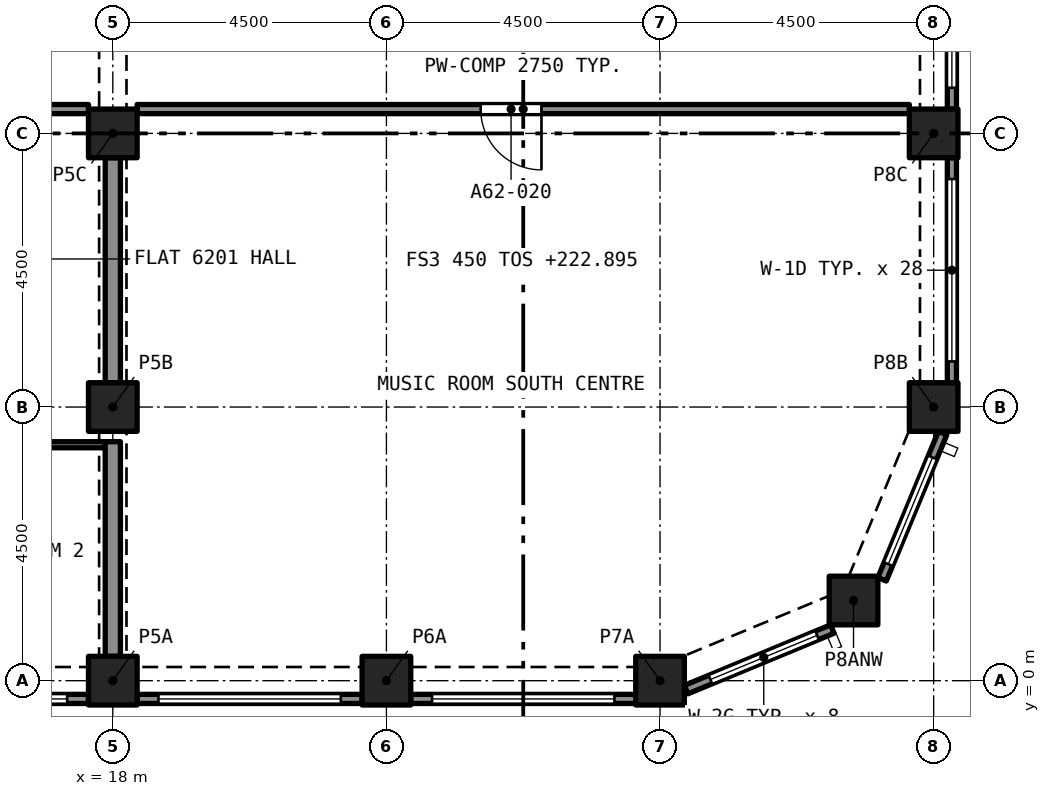
"""IFC4 building model, lengths in metres.
Left out: names, types, materials, properties, quantities, classifications, styles, units other than length and angle.
Written with IfcOpenShell. Run it as: python <this file> out.ifc"""

import sys

from ifc_helpers import new_model, si_unit, direction, frame, frame_2d, origin, origin_2d, place, context, subcontext, project, spatial, rectangle, extrude, element, fill, save


model = new_model("IFC4")
c1 = context("Model", 3, precision=1e-05, world=origin(), true_north=direction((0.0, 1.0)))
c2 = subcontext(c1, "Body", "Model", "MODEL_VIEW")
j1 = project(units=[si_unit("LENGTHUNIT", "METRE"), si_unit("PLANEANGLEUNIT", "RADIAN")], contexts=[c1])
p1 = place(None, origin())
s1 = spatial("IfcSite", under=j1, at=p1, CompositionType="ELEMENT")
p2 = place(p1, origin())
s2 = spatial("IfcBuilding", under=s1, at=p2, CompositionType="ELEMENT")
p3 = place(p2, frame((0.0, 0.0, 222.895)))
s3 = spatial("IfcBuildingStorey", under=s2, at=p3, CompositionType="ELEMENT", Elevation=222.895)
for number, where, z_axis, x_axis in (
    (1, (18.0, 0.0, 0.0), (0.0, 0.0, 1.0), (1.0, 0.0, 0.0)),
    (2, (22.5, 0.0, 0.0), (0.0, 0.0, 1.0), (1.0, 0.0, 0.0)),
    (3, (27.0, 0.0, 0.0), (0.0, 0.0, 1.0), (1.0, 0.0, 0.0)),
    (4, (30.182, 1.318, 0.0), (0.0, 0.0, 1.0), (1.0, 0.0, 0.0)),
    (5, (18.0, 4.5, 0.0), (0.0, 0.0, 1.0), (1.0, 0.0, 0.0)),
    (6, (31.5, 4.5, 0.0), (0.0, 0.0, 1.0), (1.0, 0.0, 0.0)),
    (7, (18.0, 9.0, 0.0), (0.0, 0.0, 1.0), (1.0, 0.0, 0.0)),
    (8, (31.5, 9.0, 0.0), (0.0, 0.0, 1.0), (1.0, 0.0, 0.0)),
):
    element("IfcColumn", number, at=place(p3, frame(where, z_axis=z_axis, x_axis=x_axis)), inside=s3, PredefinedType="COLUMN", context=c2, shape_type="SweptSolid", body=[
        extrude(rectangle(XDim=0.8, YDim=0.8, at=origin_2d()), origin(), (0.0, 0.0, 1.0), 3.2),
    ])
p4 = place(p3, frame((29.833, 0.849, 0.0), z_axis=(0.0, 0.0, 1.0), x_axis=(-0.923885342263, -0.382669406082, 0.0)))
e9 = element("IfcWall", 9, at=p4, inside=s3, PredefinedType="SOLIDWALL", context=c2, shape_type="SweptSolid", body=[
    extrude(rectangle(XDim=2.602, YDim=0.15, at=frame_2d((1.301, 0.0))), origin(), (0.0, 0.0, 1.0), 3.2),
])
p5 = place(p4, frame((0.27, 0.0, 0.45)))
e10 = element("IfcOpeningElement", 10, at=p5, cuts=e9, PredefinedType="OPENING", context=c2, shape_type="SweptSolid", body=[
    extrude(rectangle(XDim=1.9, YDim=1.95, at=frame_2d((0.95, 0.975))), frame((0.0, 0.085, 0.0), z_axis=(0.0, -1.0, 0.0), x_axis=(1.0, 0.0, 0.0)), (0.0, 0.0, 1.0), 0.17),
])
p6 = place(p3, frame((31.647, 4.071, 0.0), z_axis=(0.0, 0.0, 1.0), x_axis=(-0.382669406082, -0.923885342263, 0.0)))
e11 = element("IfcWall", 11, at=p6, inside=s3, PredefinedType="SOLIDWALL", context=c2, shape_type="SweptSolid", body=[
    extrude(rectangle(XDim=2.602, YDim=0.15, at=frame_2d((1.301, 0.0))), origin(), (0.0, 0.0, 1.0), 3.2),
])
p7 = place(p6, frame((0.432, 0.0, 0.45)))
e12 = element("IfcOpeningElement", 12, at=p7, cuts=e11, PredefinedType="OPENING", context=c2, shape_type="SweptSolid", body=[
    extrude(rectangle(XDim=1.9, YDim=1.95, at=frame_2d((0.95, 0.975))), frame((0.0, 0.085, 0.0), z_axis=(0.0, -1.0, 0.0), x_axis=(1.0, 0.0, 0.0)), (0.0, 0.0, 1.0), 0.17),
])
p8 = place(p3, frame((31.8, 8.6, 0.0), z_axis=(0.0, 0.0, 1.0), x_axis=(0.0, -1.0, 0.0)))
e13 = element("IfcWall", 13, at=p8, inside=s3, PredefinedType="SOLIDWALL", context=c2, shape_type="SweptSolid", body=[
    extrude(rectangle(XDim=3.7, YDim=0.15, at=frame_2d((1.85, 0.0))), origin(), (0.0, 0.0, 1.0), 3.2),
])
p9 = place(p8, frame((0.35, 0.0, 0.45)))
e14 = element("IfcOpeningElement", 14, at=p9, cuts=e13, PredefinedType="OPENING", context=c2, shape_type="SweptSolid", body=[
    extrude(rectangle(XDim=3.0, YDim=1.95, at=frame_2d((1.5, 0.975))), frame((0.0, 0.085, 0.0), z_axis=(0.0, -1.0, 0.0), x_axis=(1.0, 0.0, 0.0)), (0.0, 0.0, 1.0), 0.17),
])
p10 = place(p3, frame((31.8, 13.1, 0.0), z_axis=(0.0, 0.0, 1.0), x_axis=(0.0, -1.0, 0.0)))
e15 = element("IfcWall", 15, at=p10, inside=s3, PredefinedType="SOLIDWALL", context=c2, shape_type="SweptSolid", body=[
    extrude(rectangle(XDim=3.7, YDim=0.15, at=frame_2d((1.85, 0.0))), origin(), (0.0, 0.0, 1.0), 3.2),
])
p11 = place(p10, frame((0.35, 0.0, 0.45)))
e16 = element("IfcOpeningElement", 16, at=p11, cuts=e15, PredefinedType="OPENING", context=c2, shape_type="SweptSolid", body=[
    extrude(rectangle(XDim=3.0, YDim=1.95, at=frame_2d((1.5, 0.975))), frame((0.0, 0.085, 0.0), z_axis=(0.0, -1.0, 0.0), x_axis=(1.0, 0.0, 0.0)), (0.0, 0.0, 1.0), 0.17),
])
p12 = place(p3, frame((17.6, -0.3, 0.0), z_axis=(0.0, 0.0, 1.0), x_axis=(-1.0, 0.0, 0.0)))
e17 = element("IfcWall", 17, at=p12, inside=s3, PredefinedType="SOLIDWALL", context=c2, shape_type="SweptSolid", body=[
    extrude(rectangle(XDim=3.7, YDim=0.15, at=frame_2d((1.85, 0.0))), origin(), (0.0, 0.0, 1.0), 3.2),
])
p13 = place(p12, frame((0.35, 0.0, 0.45)))
e18 = element("IfcOpeningElement", 18, at=p13, cuts=e17, PredefinedType="OPENING", context=c2, shape_type="SweptSolid", body=[
    extrude(rectangle(XDim=3.0, YDim=1.95, at=frame_2d((1.5, 0.975))), frame((0.0, 0.085, 0.0), z_axis=(0.0, -1.0, 0.0), x_axis=(1.0, 0.0, 0.0)), (0.0, 0.0, 1.0), 0.17),
])
p14 = place(p3, frame((22.1, -0.3, 0.0), z_axis=(0.0, 0.0, 1.0), x_axis=(-1.0, 0.0, 0.0)))
e19 = element("IfcWall", 19, at=p14, inside=s3, PredefinedType="SOLIDWALL", context=c2, shape_type="SweptSolid", body=[
    extrude(rectangle(XDim=3.7, YDim=0.15, at=frame_2d((1.85, 0.0))), origin(), (0.0, 0.0, 1.0), 3.2),
])
p15 = place(p14, frame((0.35, 0.0, 0.45)))
e20 = element("IfcOpeningElement", 20, at=p15, cuts=e19, PredefinedType="OPENING", context=c2, shape_type="SweptSolid", body=[
    extrude(rectangle(XDim=3.0, YDim=1.95, at=frame_2d((1.5, 0.975))), frame((0.0, 0.085, 0.0), z_axis=(0.0, -1.0, 0.0), x_axis=(1.0, 0.0, 0.0)), (0.0, 0.0, 1.0), 0.17),
])
p16 = place(p3, frame((26.6, -0.3, 0.0), z_axis=(0.0, 0.0, 1.0), x_axis=(-1.0, 0.0, 0.0)))
e21 = element("IfcWall", 21, at=p16, inside=s3, PredefinedType="SOLIDWALL", context=c2, shape_type="SweptSolid", body=[
    extrude(rectangle(XDim=3.7, YDim=0.15, at=frame_2d((1.85, 0.0))), origin(), (0.0, 0.0, 1.0), 3.2),
])
p17 = place(p16, frame((0.35, 0.0, 0.45)))
e22 = element("IfcOpeningElement", 22, at=p17, cuts=e21, PredefinedType="OPENING", context=c2, shape_type="SweptSolid", body=[
    extrude(rectangle(XDim=3.0, YDim=1.95, at=frame_2d((1.5, 0.975))), frame((0.0, 0.085, 0.0), z_axis=(0.0, -1.0, 0.0), x_axis=(1.0, 0.0, 0.0)), (0.0, 0.0, 1.0), 0.17),
])
p18 = place(p3, frame((17.875, 3.88, 0.0), z_axis=(0.0, 0.0, 1.0), x_axis=(-1.0, 0.0, 0.0)))
e23 = element("IfcWall", 23, at=p18, inside=s3, PredefinedType="PARTITIONING", context=c2, shape_type="SweptSolid", body=[
    extrude(rectangle(XDim=4.375, YDim=0.1, at=frame_2d((2.188, 0.0))), origin(), (0.0, 0.0, 1.0), 2.9),
])
p19 = place(p18, frame((1.675, 0.0, 0.0)))
e24 = element("IfcOpeningElement", 24, at=p19, cuts=e23, PredefinedType="OPENING", context=c2, shape_type="SweptSolid", body=[
    extrude(rectangle(XDim=0.9, YDim=2.1, at=frame_2d((0.45, 1.05))), frame((0.0, 0.06, 0.0), z_axis=(0.0, -1.0, 0.0), x_axis=(1.0, 0.0, 0.0)), (0.0, 0.0, 1.0), 0.12),
])
p20 = place(p3, frame((18.0, 0.4, 0.0), z_axis=(0.0, 0.0, 1.0), x_axis=(0.0, 1.0, 0.0)))
e25 = element("IfcWall", 25, at=p20, inside=s3, PredefinedType="PARTITIONING", context=c2, shape_type="SweptSolid", body=[
    extrude(rectangle(XDim=3.53, YDim=0.25, at=frame_2d((1.765, 0.0))), origin(), (0.0, 0.0, 1.0), 2.38),
])
p21 = place(p3, frame((18.0, 4.9, 0.0), z_axis=(0.0, 0.0, 1.0), x_axis=(0.0, 1.0, 0.0)))
e26 = element("IfcWall", 26, at=p21, inside=s3, PredefinedType="PARTITIONING", context=c2, shape_type="SweptSolid", body=[
    extrude(rectangle(XDim=3.7, YDim=0.25, at=frame_2d((1.85, 0.0))), origin(), (0.0, 0.0, 1.0), 2.38),
])
p22 = place(p3, frame((17.6, 9.4, 0.0), z_axis=(0.0, 0.0, 1.0), x_axis=(-1.0, 0.0, 0.0)))
e27 = element("IfcWall", 27, at=p22, inside=s3, PredefinedType="PARTITIONING", context=c2, shape_type="SweptSolid", body=[
    extrude(rectangle(XDim=2.65, YDim=0.15, at=frame_2d((1.325, 0.0))), origin(), (0.0, 0.0, 1.0), 2.9),
])
p23 = place(p22, frame((1.25, 0.0, 0.0)))
e28 = element("IfcOpeningElement", 28, at=p23, cuts=e27, PredefinedType="OPENING", context=c2, shape_type="SweptSolid", body=[
    extrude(rectangle(XDim=1.2, YDim=2.4, at=frame_2d((0.6, 1.2))), frame((0.0, 0.085, 0.0), z_axis=(0.0, -1.0, 0.0), x_axis=(1.0, 0.0, 0.0)), (0.0, 0.0, 1.0), 0.17),
])
p24 = place(p3, frame((31.1, 9.4, 0.0), z_axis=(0.0, 0.0, 1.0), x_axis=(-1.0, 0.0, 0.0)))
e29 = element("IfcWall", 29, at=p24, inside=s3, PredefinedType="PARTITIONING", context=c2, shape_type="SweptSolid", body=[
    extrude(rectangle(XDim=12.7, YDim=0.15, at=frame_2d((6.35, 0.0))), origin(), (0.0, 0.0, 1.0), 2.75),
])
p25 = place(p24, frame((6.05, 0.0, 0.0)))
e30 = element("IfcOpeningElement", 30, at=p25, cuts=e29, PredefinedType="OPENING", context=c2, shape_type="SweptSolid", body=[
    extrude(rectangle(XDim=1.0, YDim=2.1, at=frame_2d((0.5, 1.05))), frame((0.0, 0.085, 0.0), z_axis=(0.0, -1.0, 0.0), x_axis=(1.0, 0.0, 0.0)), (0.0, 0.0, 1.0), 0.17),
])
p26 = place(p5, origin())
e31 = element("IfcWindow", 31, at=p26, inside=s3, PartitioningType="SINGLE_PANEL", PredefinedType="WINDOW", context=c2, shape_type="SweptSolid", body=[
    extrude(rectangle(XDim=1.9, YDim=1.95, at=frame_2d((0.95, 0.975))), frame((0.0, 0.03, 0.0), z_axis=(0.0, -1.0, 0.0), x_axis=(1.0, 0.0, 0.0)), (0.0, 0.0, 1.0), 0.06),
])
fill(e10, e31)
p27 = place(p7, origin())
e32 = element("IfcWindow", 32, at=p27, inside=s3, PartitioningType="SINGLE_PANEL", PredefinedType="WINDOW", context=c2, shape_type="SweptSolid", body=[
    extrude(rectangle(XDim=1.9, YDim=1.95, at=frame_2d((0.95, 0.975))), frame((0.0, 0.03, 0.0), z_axis=(0.0, -1.0, 0.0), x_axis=(1.0, 0.0, 0.0)), (0.0, 0.0, 1.0), 0.06),
])
fill(e12, e32)
p28 = place(p9, origin())
e33 = element("IfcWindow", 33, at=p28, inside=s3, PartitioningType="SINGLE_PANEL", PredefinedType="WINDOW", context=c2, shape_type="SweptSolid", body=[
    extrude(rectangle(XDim=3.0, YDim=1.95, at=frame_2d((1.5, 0.975))), frame((0.0, 0.03, 0.0), z_axis=(0.0, -1.0, 0.0), x_axis=(1.0, 0.0, 0.0)), (0.0, 0.0, 1.0), 0.06),
])
fill(e14, e33)
p29 = place(p11, origin())
e34 = element("IfcWindow", 34, at=p29, inside=s3, PartitioningType="SINGLE_PANEL", PredefinedType="WINDOW", context=c2, shape_type="SweptSolid", body=[
    extrude(rectangle(XDim=3.0, YDim=1.95, at=frame_2d((1.5, 0.975))), frame((0.0, 0.03, 0.0), z_axis=(0.0, -1.0, 0.0), x_axis=(1.0, 0.0, 0.0)), (0.0, 0.0, 1.0), 0.06),
])
fill(e16, e34)
p30 = place(p13, origin())
e35 = element("IfcWindow", 35, at=p30, inside=s3, PartitioningType="SINGLE_PANEL", PredefinedType="WINDOW", context=c2, shape_type="SweptSolid", body=[
    extrude(rectangle(XDim=3.0, YDim=1.95, at=frame_2d((1.5, 0.975))), frame((0.0, 0.03, 0.0), z_axis=(0.0, -1.0, 0.0), x_axis=(1.0, 0.0, 0.0)), (0.0, 0.0, 1.0), 0.06),
])
fill(e18, e35)
p31 = place(p15, origin())
e36 = element("IfcWindow", 36, at=p31, inside=s3, PartitioningType="SINGLE_PANEL", PredefinedType="WINDOW", context=c2, shape_type="SweptSolid", body=[
    extrude(rectangle(XDim=3.0, YDim=1.95, at=frame_2d((1.5, 0.975))), frame((0.0, 0.03, 0.0), z_axis=(0.0, -1.0, 0.0), x_axis=(1.0, 0.0, 0.0)), (0.0, 0.0, 1.0), 0.06),
])
fill(e20, e36)
p32 = place(p17, origin())
e37 = element("IfcWindow", 37, at=p32, inside=s3, PartitioningType="SINGLE_PANEL", PredefinedType="WINDOW", context=c2, shape_type="SweptSolid", body=[
    extrude(rectangle(XDim=3.0, YDim=1.95, at=frame_2d((1.5, 0.975))), frame((0.0, 0.03, 0.0), z_axis=(0.0, -1.0, 0.0), x_axis=(1.0, 0.0, 0.0)), (0.0, 0.0, 1.0), 0.06),
])
fill(e22, e37)
p33 = place(p25, origin())
e38 = element("IfcDoor", 38, at=p33, inside=s3, OperationType="SINGLE_SWING_RIGHT", PredefinedType="DOOR", context=c2, shape_type="SweptSolid", body=[
    extrude(rectangle(XDim=1.0, YDim=2.1, at=frame_2d((0.5, 1.05))), frame((0.0, 0.025, 0.0), z_axis=(0.0, -1.0, 0.0), x_axis=(1.0, 0.0, 0.0)), (0.0, 0.0, 1.0), 0.05),
])
fill(e30, e38)
save(model, sys.argv[1])
